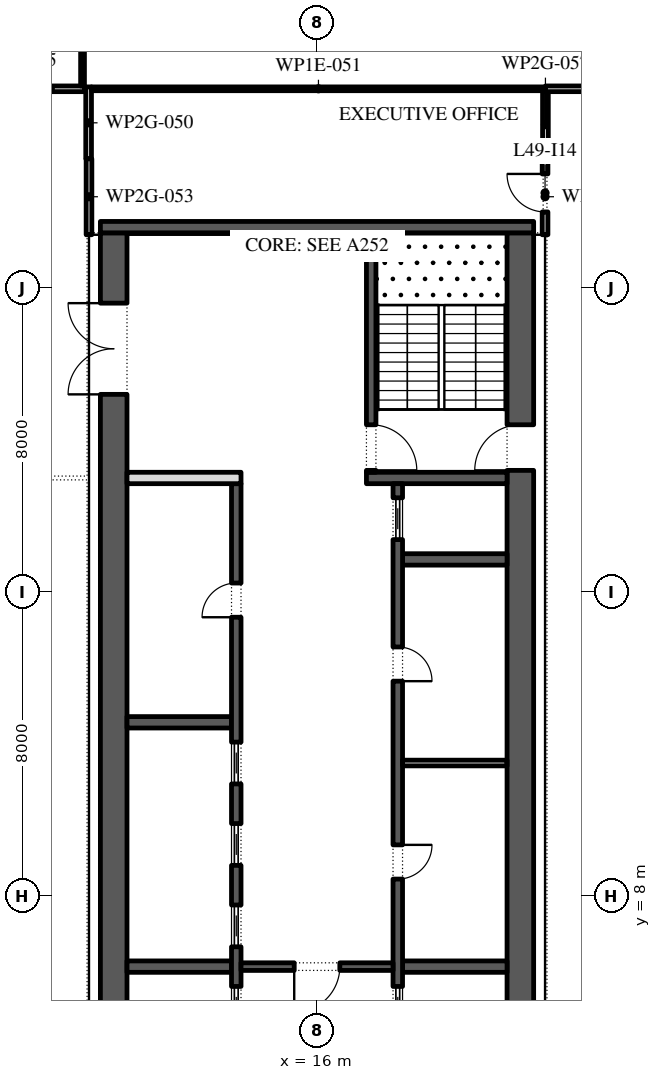
"""IFC4 building model, lengths in metres.
Left out: names, types, materials, properties, quantities, classifications, styles, units other than length and angle.
Written with IfcOpenShell. Run it as: python <this file> out.ifc"""

import sys

from ifc_helpers import new_model, si_unit, direction, frame, frame_2d, origin, place, context, subcontext, project, spatial, rectangle, extrude, element, fill, save


model = new_model("IFC4")
c1 = context("Model", 3, precision=1e-05, world=origin(), true_north=direction((0.0, 1.0)))
c2 = subcontext(c1, "Body", "Model", "MODEL_VIEW")
j1 = project(units=[si_unit("LENGTHUNIT", "METRE"), si_unit("PLANEANGLEUNIT", "RADIAN")], contexts=[c1])
p1 = place(None, origin())
s1 = spatial("IfcSite", under=j1, at=p1, CompositionType="ELEMENT")
p2 = place(p1, origin())
s2 = spatial("IfcBuilding", under=s1, at=p2, CompositionType="ELEMENT")
p3 = place(p2, frame((0.0, 0.0, 222.0)))
s3 = spatial("IfcBuildingStorey", under=s2, at=p3, CompositionType="ELEMENT", Elevation=222.0)
p4 = place(p3, frame((33.157, -5.092, 0.0), z_axis=(0.0, 0.0, 1.0), x_axis=(-0.224950279389, 0.974370243697, 0.0)))
e1 = element("IfcWall", 1, at=p4, inside=s3, PredefinedType="STANDARD", context=c2, shape_type="SweptSolid", body=[
    extrude(rectangle(XDim=49.5, YDim=0.3, at=frame_2d((24.75, 0.0))), origin(), (0.0, 0.0, 1.0), 3.75),
])
p5 = place(p4, frame((2.207, 0.0, 0.0)))
e2 = element("IfcOpeningElement", 2, at=p5, cuts=e1, PredefinedType="OPENING", context=c2, shape_type="SweptSolid", body=[
    extrude(rectangle(XDim=2.4, YDim=2.875, at=frame_2d((1.2, 1.438))), frame((0.0, 0.16, 0.0), z_axis=(0.0, -1.0, 0.0), x_axis=(1.0, 0.0, 0.0)), (0.0, 0.0, 1.0), 0.32),
])
p6 = place(p4, frame((7.871, 0.0, 0.45)))
e3 = element("IfcOpeningElement", 3, at=p6, cuts=e1, PredefinedType="OPENING", context=c2, shape_type="SweptSolid", body=[
    extrude(rectangle(XDim=5.0, YDim=2.575, at=frame_2d((2.5, 1.288))), frame((0.0, 0.16, 0.0), z_axis=(0.0, -1.0, 0.0), x_axis=(1.0, 0.0, 0.0)), (0.0, 0.0, 1.0), 0.32),
])
p7 = place(p4, frame((14.986, 0.0, 0.45)))
e4 = element("IfcOpeningElement", 4, at=p7, cuts=e1, PredefinedType="OPENING", context=c2, shape_type="SweptSolid", body=[
    extrude(rectangle(XDim=5.0, YDim=2.625, at=frame_2d((2.5, 1.312))), frame((0.0, 0.16, 0.0), z_axis=(0.0, -1.0, 0.0), x_axis=(1.0, 0.0, 0.0)), (0.0, 0.0, 1.0), 0.32),
])
p8 = place(p4, frame((22.1, 0.0, 0.45)))
e5 = element("IfcOpeningElement", 5, at=p8, cuts=e1, PredefinedType="OPENING", context=c2, shape_type="SweptSolid", body=[
    extrude(rectangle(XDim=5.0, YDim=2.75, at=frame_2d((2.5, 1.375))), frame((0.0, 0.16, 0.0), z_axis=(0.0, -1.0, 0.0), x_axis=(1.0, 0.0, 0.0)), (0.0, 0.0, 1.0), 0.32),
])
p9 = place(p4, frame((30.514, 0.0, 0.0)))
e6 = element("IfcOpeningElement", 6, at=p9, cuts=e1, PredefinedType="OPENING", context=c2, shape_type="SweptSolid", body=[
    extrude(rectangle(XDim=2.4, YDim=3.2, at=frame_2d((1.2, 1.6))), frame((0.0, 0.16, 0.0), z_axis=(0.0, -1.0, 0.0), x_axis=(1.0, 0.0, 0.0)), (0.0, 0.0, 1.0), 0.32),
])
p10 = place(p4, frame((36.329, 0.0, 0.45)))
e7 = element("IfcOpeningElement", 7, at=p10, cuts=e1, PredefinedType="OPENING", context=c2, shape_type="SweptSolid", body=[
    extrude(rectangle(XDim=5.0, YDim=3.25, at=frame_2d((2.5, 1.625))), frame((0.0, 0.16, 0.0), z_axis=(0.0, -1.0, 0.0), x_axis=(1.0, 0.0, 0.0)), (0.0, 0.0, 1.0), 0.32),
])
p11 = place(p4, frame((43.443, 0.0, 0.45)))
e8 = element("IfcOpeningElement", 8, at=p11, cuts=e1, PredefinedType="OPENING", context=c2, shape_type="SweptSolid", body=[
    extrude(rectangle(XDim=5.0, YDim=3.25, at=frame_2d((2.5, 1.625))), frame((0.0, 0.16, 0.0), z_axis=(0.0, -1.0, 0.0), x_axis=(1.0, 0.0, 0.0)), (0.0, 0.0, 1.0), 0.32),
])
p12 = place(p3, frame((21.35, -2.45, 0.0), z_axis=(0.0, 0.0, 1.0), x_axis=(0.0, 1.0, 0.0)))
e9 = element("IfcWall", 9, at=p12, inside=s3, PredefinedType="SHEAR", context=c2, shape_type="SweptSolid", body=[
    extrude(rectangle(XDim=27.9, YDim=0.7, at=frame_2d((13.95, 0.0))), origin(), (0.0, 0.0, 1.0), 3.75),
])
p13 = place(p12, frame((5.05, 0.0, 0.0)))
e10 = element("IfcOpeningElement", 10, at=p13, cuts=e9, PredefinedType="OPENING", context=c2, shape_type="SweptSolid", body=[
    extrude(rectangle(XDim=1.2, YDim=2.1, at=frame_2d((0.6, 1.05))), frame((0.0, 0.36, 0.0), z_axis=(0.0, -1.0, 0.0), x_axis=(1.0, 0.0, 0.0)), (0.0, 0.0, 1.0), 0.72),
])
p14 = place(p12, frame((21.65, 0.0, 0.0)))
e11 = element("IfcOpeningElement", 11, at=p14, cuts=e9, PredefinedType="OPENING", context=c2, shape_type="SweptSolid", body=[
    extrude(rectangle(XDim=1.2, YDim=2.1, at=frame_2d((0.6, 1.05))), frame((0.0, 0.36, 0.0), z_axis=(0.0, -1.0, 0.0), x_axis=(1.0, 0.0, 0.0)), (0.0, 0.0, 1.0), 0.72),
])
p15 = place(p3, frame((10.65, -2.45, 0.0), z_axis=(0.0, 0.0, 1.0), x_axis=(0.0, 1.0, 0.0)))
e12 = element("IfcWall", 12, at=p15, inside=s3, PredefinedType="SHEAR", context=c2, shape_type="SweptSolid", body=[
    extrude(rectangle(XDim=27.9, YDim=0.7, at=frame_2d((13.95, 0.0))), origin(), (0.0, 0.0, 1.0), 3.75),
])
p16 = place(p15, frame((23.65, 0.0, 0.0)))
e13 = element("IfcOpeningElement", 13, at=p16, cuts=e12, PredefinedType="OPENING", context=c2, shape_type="SweptSolid", body=[
    extrude(rectangle(XDim=2.4, YDim=2.1, at=frame_2d((1.2, 1.05))), frame((0.0, 0.36, 0.0), z_axis=(0.0, -1.0, 0.0), x_axis=(1.0, 0.0, 0.0)), (0.0, 0.0, 1.0), 0.72),
])
p17 = place(p15, frame((0.788, 0.0, 0.0)))
e14 = element("IfcOpeningElement", 14, at=p17, cuts=e12, PredefinedType="OPENING", context=c2, shape_type="SweptSolid", body=[
    extrude(rectangle(XDim=0.9, YDim=2.1, at=frame_2d((0.45, 1.05))), frame((0.0, 0.36, 0.0), z_axis=(0.0, -1.0, 0.0), x_axis=(1.0, 0.0, 0.0)), (0.0, 0.0, 1.0), 0.72),
])
p18 = place(p15, frame((3.962, 0.0, 0.0)))
e15 = element("IfcOpeningElement", 15, at=p18, cuts=e12, PredefinedType="OPENING", context=c2, shape_type="SweptSolid", body=[
    extrude(rectangle(XDim=1.0, YDim=2.1, at=frame_2d((0.5, 1.05))), frame((0.0, 0.36, 0.0), z_axis=(0.0, -1.0, 0.0), x_axis=(1.0, 0.0, 0.0)), (0.0, 0.0, 1.0), 0.72),
])
p19 = place(p3, frame((10.3, 25.6, 0.0), z_axis=(0.0, 0.0, 1.0), x_axis=(1.0, 0.0, 0.0)))
e16 = element("IfcWall", 16, at=p19, inside=s3, PredefinedType="SHEAR", context=c2, shape_type="SweptSolid", body=[
    extrude(rectangle(XDim=11.4, YDim=0.3, at=frame_2d((5.7, 0.0))), origin(), (0.0, 0.0, 1.0), 3.75),
])
p20 = place(p3, frame((17.3, 19.0, 0.0), z_axis=(0.0, 0.0, 1.0), x_axis=(1.0, 0.0, 0.0)))
e17 = element("IfcWall", 17, at=p20, inside=s3, PredefinedType="SHEAR", context=c2, shape_type="SweptSolid", body=[
    extrude(rectangle(XDim=3.7, YDim=0.3, at=frame_2d((1.85, 0.0))), origin(), (0.0, 0.0, 1.0), 3.75),
])
p21 = place(p3, frame((17.425, 19.15, 0.0), z_axis=(0.0, 0.0, 1.0), x_axis=(0.0, 1.0, 0.0)))
e18 = element("IfcWall", 18, at=p21, inside=s3, PredefinedType="SHEAR", context=c2, shape_type="SweptSolid", body=[
    extrude(rectangle(XDim=6.3, YDim=0.25, at=frame_2d((3.15, 0.0))), origin(), (0.0, 0.0, 1.0), 3.75),
])
p22 = place(p21, frame((0.05, 0.0, 0.0)))
e19 = element("IfcOpeningElement", 19, at=p22, cuts=e18, PredefinedType="OPENING", context=c2, shape_type="SweptSolid", body=[
    extrude(rectangle(XDim=1.2, YDim=2.1, at=frame_2d((0.6, 1.05))), frame((0.0, 0.135, 0.0), z_axis=(0.0, -1.0, 0.0), x_axis=(1.0, 0.0, 0.0)), (0.0, 0.0, 1.0), 0.27),
])
for number, where, z_axis, x_axis in (
    (20, (18.25, 6.143, 0.0), (0.0, 0.0, 1.0), (1.0, 0.0, 0.0)),
    (21, (18.25, 16.857, 0.0), (0.0, 0.0, 1.0), (1.0, 0.0, 0.0)),
):
    element("IfcWall", number, at=place(p3, frame(where, z_axis=z_axis, x_axis=x_axis)), inside=s3, PredefinedType="SHEAR", context=c2, shape_type="SweptSolid", body=[
        extrude(rectangle(XDim=2.75, YDim=0.3, at=frame_2d((1.375, 0.0))), origin(), (0.0, 0.0, 1.0), 3.75),
    ])
p23 = place(p3, frame((18.125, 4.15, 0.0), z_axis=(0.0, 0.0, 1.0), x_axis=(0.0, 1.0, 0.0)))
e22 = element("IfcWall", 22, at=p23, inside=s3, PredefinedType="SHEAR", context=c2, shape_type="SweptSolid", body=[
    extrude(rectangle(XDim=14.7, YDim=0.25, at=frame_2d((7.35, 0.0))), origin(), (0.0, 0.0, 1.0), 3.75),
])
p24 = place(p23, frame((4.296, 0.0, 0.0)))
e23 = element("IfcOpeningElement", 23, at=p24, cuts=e22, PredefinedType="OPENING", context=c2, shape_type="SweptSolid", body=[
    extrude(rectangle(XDim=0.9, YDim=2.1, at=frame_2d((0.45, 1.05))), frame((0.0, 0.135, 0.0), z_axis=(0.0, -1.0, 0.0), x_axis=(1.0, 0.0, 0.0)), (0.0, 0.0, 1.0), 0.27),
])
p25 = place(p23, frame((9.504, 0.0, 0.0)))
e24 = element("IfcOpeningElement", 24, at=p25, cuts=e22, PredefinedType="OPENING", context=c2, shape_type="SweptSolid", body=[
    extrude(rectangle(XDim=0.9, YDim=2.1, at=frame_2d((0.45, 1.05))), frame((0.0, 0.135, 0.0), z_axis=(0.0, -1.0, 0.0), x_axis=(1.0, 0.0, 0.0)), (0.0, 0.0, 1.0), 0.27),
])
p26 = place(p23, frame((0.371, 0.0, 0.0)))
e25 = element("IfcOpeningElement", 25, at=p26, cuts=e22, PredefinedType="OPENING", context=c2, shape_type="SweptSolid", body=[
    extrude(rectangle(XDim=1.1, YDim=2.1, at=frame_2d((0.55, 1.05))), frame((0.0, 0.135, 0.0), z_axis=(0.0, -1.0, 0.0), x_axis=(1.0, 0.0, 0.0)), (0.0, 0.0, 1.0), 0.27),
])
p27 = place(p23, frame((13.229, 0.0, 0.0)))
e26 = element("IfcOpeningElement", 26, at=p27, cuts=e22, PredefinedType="OPENING", context=c2, shape_type="SweptSolid", body=[
    extrude(rectangle(XDim=1.1, YDim=2.1, at=frame_2d((0.55, 1.05))), frame((0.0, 0.135, 0.0), z_axis=(0.0, -1.0, 0.0), x_axis=(1.0, 0.0, 0.0)), (0.0, 0.0, 1.0), 0.27),
])
p28 = place(p3, frame((18.25, 11.5, 0.0), z_axis=(0.0, 0.0, 1.0), x_axis=(1.0, 0.0, 0.0)))
e27 = element("IfcWall", 27, at=p28, inside=s3, PredefinedType="PARTITIONING", context=c2, shape_type="SweptSolid", body=[
    extrude(rectangle(XDim=2.75, YDim=0.15, at=frame_2d((1.375, 0.0))), origin(), (0.0, 0.0, 1.0), 3.75),
])
for number, where, z_axis, x_axis in (
    (28, (11.0, 6.143, 0.0), (0.0, 0.0, 1.0), (1.0, 0.0, 0.0)),
    (29, (11.0, 12.571, 0.0), (0.0, 0.0, 1.0), (1.0, 0.0, 0.0)),
):
    element("IfcWall", number, at=place(p3, frame(where, z_axis=z_axis, x_axis=x_axis)), inside=s3, PredefinedType="SHEAR", context=c2, shape_type="SweptSolid", body=[
        extrude(rectangle(XDim=2.75, YDim=0.3, at=frame_2d((1.375, 0.0))), origin(), (0.0, 0.0, 1.0), 3.75),
    ])
p29 = place(p3, frame((13.875, -2.45, 0.0), z_axis=(0.0, 0.0, 1.0), x_axis=(0.0, 1.0, 0.0)))
e30 = element("IfcWall", 30, at=p29, inside=s3, PredefinedType="SHEAR", context=c2, shape_type="SweptSolid", body=[
    extrude(rectangle(XDim=21.3, YDim=0.25, at=frame_2d((10.65, 0.0))), origin(), (0.0, 0.0, 1.0), 3.75),
])
p30 = place(p29, frame((17.786, 0.0, 0.0)))
e31 = element("IfcOpeningElement", 31, at=p30, cuts=e30, PredefinedType="OPENING", context=c2, shape_type="SweptSolid", body=[
    extrude(rectangle(XDim=0.9, YDim=2.1, at=frame_2d((0.45, 1.05))), frame((0.0, 0.135, 0.0), z_axis=(0.0, -1.0, 0.0), x_axis=(1.0, 0.0, 0.0)), (0.0, 0.0, 1.0), 0.27),
])
p31 = place(p29, frame((6.971, 0.0, 0.0)))
e32 = element("IfcOpeningElement", 32, at=p31, cuts=e30, PredefinedType="OPENING", context=c2, shape_type="SweptSolid", body=[
    extrude(rectangle(XDim=1.1, YDim=2.1, at=frame_2d((0.55, 1.05))), frame((0.0, 0.135, 0.0), z_axis=(0.0, -1.0, 0.0), x_axis=(1.0, 0.0, 0.0)), (0.0, 0.0, 1.0), 0.27),
])
p32 = place(p29, frame((9.114, 0.0, 0.0)))
e33 = element("IfcOpeningElement", 33, at=p32, cuts=e30, PredefinedType="OPENING", context=c2, shape_type="SweptSolid", body=[
    extrude(rectangle(XDim=1.1, YDim=2.1, at=frame_2d((0.55, 1.05))), frame((0.0, 0.135, 0.0), z_axis=(0.0, -1.0, 0.0), x_axis=(1.0, 0.0, 0.0)), (0.0, 0.0, 1.0), 0.27),
])
p33 = place(p29, frame((11.257, 0.0, 0.0)))
e34 = element("IfcOpeningElement", 34, at=p33, cuts=e30, PredefinedType="OPENING", context=c2, shape_type="SweptSolid", body=[
    extrude(rectangle(XDim=1.1, YDim=2.1, at=frame_2d((0.55, 1.05))), frame((0.0, 0.135, 0.0), z_axis=(0.0, -1.0, 0.0), x_axis=(1.0, 0.0, 0.0)), (0.0, 0.0, 1.0), 0.27),
])
p34 = place(p29, frame((13.4, 0.0, 0.0)))
e35 = element("IfcOpeningElement", 35, at=p34, cuts=e30, PredefinedType="OPENING", context=c2, shape_type="SweptSolid", body=[
    extrude(rectangle(XDim=1.1, YDim=2.1, at=frame_2d((0.55, 1.05))), frame((0.0, 0.135, 0.0), z_axis=(0.0, -1.0, 0.0), x_axis=(1.0, 0.0, 0.0)), (0.0, 0.0, 1.0), 0.27),
])
p35 = place(p3, frame((11.0, 19.0, 0.0), z_axis=(0.0, 0.0, 1.0), x_axis=(1.0, 0.0, 0.0)))
e36 = element("IfcWall", 36, at=p35, inside=s3, PredefinedType="PARTITIONING", context=c2, shape_type="SweptSolid", body=[
    extrude(rectangle(XDim=3.0, YDim=0.3, at=frame_2d((1.5, 0.0))), origin(), (0.0, 0.0, 1.0), 3.75),
])
p36 = place(p3, frame((14.0, 6.143, 0.0), z_axis=(0.0, 0.0, 1.0), x_axis=(1.0, 0.0, 0.0)))
e37 = element("IfcWall", 37, at=p36, inside=s3, PredefinedType="SHEAR", context=c2, shape_type="SweptSolid", body=[
    extrude(rectangle(XDim=4.0, YDim=0.2, at=frame_2d((2.0, 0.0))), origin(), (0.0, 0.0, 1.0), 3.75),
])
p37 = place(p36, frame((1.4, 0.0, 0.0)))
e38 = element("IfcOpeningElement", 38, at=p37, cuts=e37, PredefinedType="OPENING", context=c2, shape_type="SweptSolid", body=[
    extrude(rectangle(XDim=1.2, YDim=2.1, at=frame_2d((0.6, 1.05))), frame((0.0, 0.11, 0.0), z_axis=(0.0, -1.0, 0.0), x_axis=(1.0, 0.0, 0.0)), (0.0, 0.0, 1.0), 0.22),
])
p38 = place(p3, frame((8.085, 29.24, 0.0), z_axis=(0.0, 0.0, 1.0), x_axis=(1.0, 0.0, 0.0)))
e39 = element("IfcWall", 39, at=p38, inside=s3, PredefinedType="PARTITIONING", context=c2, shape_type="SweptSolid", body=[
    extrude(rectangle(XDim=1.795, YDim=0.15, at=frame_2d((0.897, 0.0))), origin(), (0.0, 0.0, 1.0), 3.75),
])
p39 = place(p3, frame((9.83, 36.22, 0.0), z_axis=(0.0, 0.0, 1.0), x_axis=(0.0, -1.0, 0.0)))
e40 = element("IfcWall", 40, at=p39, inside=s3, PredefinedType="PARTITIONING", context=c2, shape_type="SweptSolid", body=[
    extrude(rectangle(XDim=6.905, YDim=0.1, at=frame_2d((3.453, 0.0))), origin(), (0.0, 0.0, 1.0), 3.75),
])
p40 = place(p3, frame((9.99, 29.29, 0.0), z_axis=(0.0, 0.0, 1.0), x_axis=(0.0, -1.0, 0.0)))
e41 = element("IfcWall", 41, at=p40, inside=s3, PredefinedType="PARTITIONING", context=c2, shape_type="SweptSolid", body=[
    extrude(rectangle(XDim=1.89, YDim=0.15, at=frame_2d((0.945, 0.0))), origin(), (0.0, 0.0, 1.0), 3.75),
])
p41 = place(p3, frame((10.065, 29.24, 0.0), z_axis=(0.0, 0.0, 1.0), x_axis=(1.0, 0.0, 0.0)))
e42 = element("IfcWall", 42, at=p41, inside=s3, PredefinedType="PARTITIONING", context=c2, shape_type="SweptSolid", body=[
    extrude(rectangle(XDim=11.945, YDim=0.1, at=frame_2d((5.973, 0.0))), origin(), (0.0, 0.0, 1.0), 3.75),
])
p42 = place(p3, frame((10.0, 27.4, 0.0), z_axis=(0.0, 0.0, 1.0), x_axis=(0.0, -1.0, 0.0)))
e43 = element("IfcWall", 43, at=p42, inside=s3, PredefinedType="PARTITIONING", context=c2, shape_type="SweptSolid", body=[
    extrude(rectangle(XDim=2.0, YDim=0.15, at=frame_2d((1.0, 0.0))), origin(), (0.0, 0.0, 1.0), 3.75),
])
p43 = place(p3, frame((22.0, 25.4, 0.0), z_axis=(0.0, 0.0, 1.0), x_axis=(0.0, 1.0, 0.0)))
e44 = element("IfcWall", 44, at=p43, inside=s3, PredefinedType="PARTITIONING", context=c2, shape_type="SweptSolid", body=[
    extrude(rectangle(XDim=2.0, YDim=0.15, at=frame_2d((1.0, 0.0))), origin(), (0.0, 0.0, 1.0), 3.75),
])
p44 = place(p43, frame((0.6, 0.0, 0.0)))
e45 = element("IfcOpeningElement", 45, at=p44, cuts=e44, PredefinedType="OPENING", context=c2, shape_type="SweptSolid", body=[
    extrude(rectangle(XDim=1.0, YDim=2.1, at=frame_2d((0.5, 1.05))), frame((0.0, 0.085, 0.0), z_axis=(0.0, -1.0, 0.0), x_axis=(1.0, 0.0, 0.0)), (0.0, 0.0, 1.0), 0.17),
])
p45 = place(p3, frame((22.01, 27.4, 0.0), z_axis=(0.0, 0.0, 1.0), x_axis=(0.0, 1.0, 0.0)))
e46 = element("IfcWall", 46, at=p45, inside=s3, PredefinedType="PARTITIONING", context=c2, shape_type="SweptSolid", body=[
    extrude(rectangle(XDim=1.79, YDim=0.15, at=frame_2d((0.895, 0.0))), origin(), (0.0, 0.0, 1.0), 3.75),
])
p46 = place(p3, frame((22.01, 29.24, 0.0), z_axis=(0.0, 0.0, 1.0), x_axis=(1.0, 0.0, 0.0)))
e47 = element("IfcWall", 47, at=p46, inside=s3, PredefinedType="PARTITIONING", context=c2, shape_type="SweptSolid", body=[
    extrude(rectangle(XDim=3.15, YDim=0.15, at=frame_2d((1.575, 0.0))), origin(), (0.0, 0.0, 1.0), 3.75),
])
p47 = place(p46, frame((1.77, 0.0, 0.0)))
e48 = element("IfcOpeningElement", 48, at=p47, cuts=e47, PredefinedType="OPENING", context=c2, shape_type="SweptSolid", body=[
    extrude(rectangle(XDim=1.0, YDim=2.1, at=frame_2d((0.5, 1.05))), frame((0.0, 0.085, 0.0), z_axis=(0.0, -1.0, 0.0), x_axis=(1.0, 0.0, 0.0)), (0.0, 0.0, 1.0), 0.17),
])
p48 = place(p24, frame((0.9, -0.2, 0.0), z_axis=(0.0, 0.0, 1.0), x_axis=(-1.0, 0.0, 0.0)))
e49 = element("IfcDoor", 49, at=p48, inside=s3, OperationType="SINGLE_SWING_RIGHT", PredefinedType="DOOR", context=c2, shape_type="SweptSolid", body=[
    extrude(rectangle(XDim=0.9, YDim=2.1, at=frame_2d((0.45, 1.05))), frame((0.0, -0.075, 0.0), z_axis=(0.0, -1.0, 0.0), x_axis=(1.0, 0.0, 0.0)), (0.0, 0.0, 1.0), 0.05),
])
fill(e23, e49)
p49 = place(p25, frame((0.9, -0.2, 0.0), z_axis=(0.0, 0.0, 1.0), x_axis=(-1.0, 0.0, 0.0)))
e50 = element("IfcDoor", 50, at=p49, inside=s3, OperationType="SINGLE_SWING_LEFT", PredefinedType="DOOR", context=c2, shape_type="SweptSolid", body=[
    extrude(rectangle(XDim=0.9, YDim=2.1, at=frame_2d((0.45, 1.05))), frame((0.0, -0.075, 0.0), z_axis=(0.0, -1.0, 0.0), x_axis=(1.0, 0.0, 0.0)), (0.0, 0.0, 1.0), 0.05),
])
fill(e24, e50)
p50 = place(p26, origin())
e51 = element("IfcDoor", 51, at=p50, inside=s3, OperationType="SLIDING_TO_LEFT", PredefinedType="DOOR", context=c2, shape_type="SweptSolid", body=[
    extrude(rectangle(XDim=1.1, YDim=2.1, at=frame_2d((0.55, 1.05))), frame((0.0, 0.025, 0.0), z_axis=(0.0, -1.0, 0.0), x_axis=(1.0, 0.0, 0.0)), (0.0, 0.0, 1.0), 0.05),
])
fill(e25, e51)
p51 = place(p27, origin())
e52 = element("IfcDoor", 52, at=p51, inside=s3, OperationType="SLIDING_TO_LEFT", PredefinedType="DOOR", context=c2, shape_type="SweptSolid", body=[
    extrude(rectangle(XDim=1.1, YDim=2.1, at=frame_2d((0.55, 1.05))), frame((0.0, 0.025, 0.0), z_axis=(0.0, -1.0, 0.0), x_axis=(1.0, 0.0, 0.0)), (0.0, 0.0, 1.0), 0.05),
])
fill(e26, e52)
p52 = place(p30, origin())
e53 = element("IfcDoor", 53, at=p52, inside=s3, OperationType="SINGLE_SWING_RIGHT", PredefinedType="DOOR", context=c2, shape_type="SweptSolid", body=[
    extrude(rectangle(XDim=0.9, YDim=2.1, at=frame_2d((0.45, 1.05))), frame((0.0, 0.125, 0.0), z_axis=(0.0, -1.0, 0.0), x_axis=(1.0, 0.0, 0.0)), (0.0, 0.0, 1.0), 0.05),
])
fill(e31, e53)
p53 = place(p31, origin())
e54 = element("IfcDoor", 54, at=p53, inside=s3, OperationType="SLIDING_TO_LEFT", PredefinedType="DOOR", context=c2, shape_type="SweptSolid", body=[
    extrude(rectangle(XDim=1.1, YDim=2.1, at=frame_2d((0.55, 1.05))), frame((0.0, 0.025, 0.0), z_axis=(0.0, -1.0, 0.0), x_axis=(1.0, 0.0, 0.0)), (0.0, 0.0, 1.0), 0.05),
])
fill(e32, e54)
p54 = place(p32, origin())
e55 = element("IfcDoor", 55, at=p54, inside=s3, OperationType="SLIDING_TO_LEFT", PredefinedType="DOOR", context=c2, shape_type="SweptSolid", body=[
    extrude(rectangle(XDim=1.1, YDim=2.1, at=frame_2d((0.55, 1.05))), frame((0.0, 0.025, 0.0), z_axis=(0.0, -1.0, 0.0), x_axis=(1.0, 0.0, 0.0)), (0.0, 0.0, 1.0), 0.05),
])
fill(e33, e55)
p55 = place(p33, origin())
e56 = element("IfcDoor", 56, at=p55, inside=s3, OperationType="SLIDING_TO_LEFT", PredefinedType="DOOR", context=c2, shape_type="SweptSolid", body=[
    extrude(rectangle(XDim=1.1, YDim=2.1, at=frame_2d((0.55, 1.05))), frame((0.0, 0.025, 0.0), z_axis=(0.0, -1.0, 0.0), x_axis=(1.0, 0.0, 0.0)), (0.0, 0.0, 1.0), 0.05),
])
fill(e34, e56)
p56 = place(p34, origin())
e57 = element("IfcDoor", 57, at=p56, inside=s3, OperationType="SLIDING_TO_LEFT", PredefinedType="DOOR", context=c2, shape_type="SweptSolid", body=[
    extrude(rectangle(XDim=1.1, YDim=2.1, at=frame_2d((0.55, 1.05))), frame((0.0, 0.025, 0.0), z_axis=(0.0, -1.0, 0.0), x_axis=(1.0, 0.0, 0.0)), (0.0, 0.0, 1.0), 0.05),
])
fill(e35, e57)
p57 = place(p37, frame((1.2, 0.0, 0.0), z_axis=(0.0, 0.0, 1.0), x_axis=(-1.0, 0.0, 0.0)))
e58 = element("IfcDoor", 58, at=p57, inside=s3, OperationType="SINGLE_SWING_LEFT", PredefinedType="DOOR", context=c2, shape_type="SweptSolid", body=[
    extrude(rectangle(XDim=1.2, YDim=2.1, at=frame_2d((0.6, 1.05))), frame((0.0, 0.025, 0.0), z_axis=(0.0, -1.0, 0.0), x_axis=(1.0, 0.0, 0.0)), (0.0, 0.0, 1.0), 0.05),
])
fill(e38, e58)
p58 = place(p16, origin())
e59 = element("IfcDoor", 59, at=p58, inside=s3, OperationType="DOUBLE_DOOR_SINGLE_SWING", PredefinedType="DOOR", context=c2, shape_type="SweptSolid", body=[
    extrude(rectangle(XDim=2.4, YDim=2.1, at=frame_2d((1.2, 1.05))), frame((0.0, 0.025, 0.0), z_axis=(0.0, -1.0, 0.0), x_axis=(1.0, 0.0, 0.0)), (0.0, 0.0, 1.0), 0.05),
])
fill(e13, e59)
p59 = place(p22, frame((1.2, 0.0, 0.0), z_axis=(0.0, 0.0, 1.0), x_axis=(-1.0, 0.0, 0.0)))
e60 = element("IfcDoor", 60, at=p59, inside=s3, OperationType="SINGLE_SWING_LEFT", PredefinedType="DOOR", context=c2, shape_type="SweptSolid", body=[
    extrude(rectangle(XDim=1.2, YDim=2.1, at=frame_2d((0.6, 1.05))), frame((0.0, 0.025, 0.0), z_axis=(0.0, -1.0, 0.0), x_axis=(1.0, 0.0, 0.0)), (0.0, 0.0, 1.0), 0.05),
])
fill(e19, e60)
p60 = place(p14, origin())
e61 = element("IfcDoor", 61, at=p60, inside=s3, OperationType="SINGLE_SWING_RIGHT", PredefinedType="DOOR", context=c2, shape_type="SweptSolid", body=[
    extrude(rectangle(XDim=1.2, YDim=2.1, at=frame_2d((0.6, 1.05))), frame((0.0, 0.025, 0.0), z_axis=(0.0, -1.0, 0.0), x_axis=(1.0, 0.0, 0.0)), (0.0, 0.0, 1.0), 0.05),
])
fill(e11, e61)
p61 = place(p44, origin())
e62 = element("IfcDoor", 62, at=p61, inside=s3, OperationType="SINGLE_SWING_LEFT", PredefinedType="DOOR", context=c2, shape_type="SweptSolid", body=[
    extrude(rectangle(XDim=1.0, YDim=2.1, at=frame_2d((0.5, 1.05))), frame((0.0, 0.025, 0.0), z_axis=(0.0, -1.0, 0.0), x_axis=(1.0, 0.0, 0.0)), (0.0, 0.0, 1.0), 0.05),
])
fill(e45, e62)
save(model, sys.argv[1])
